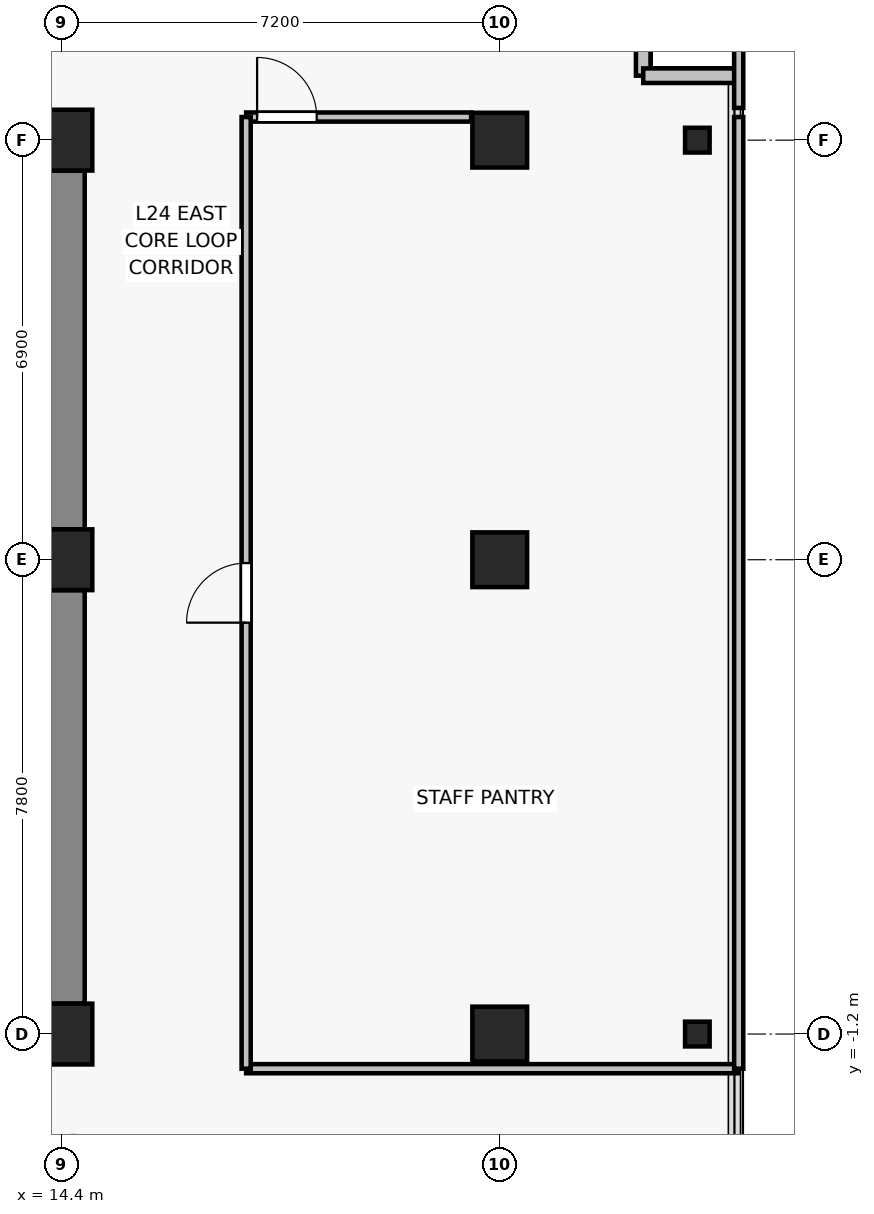
"""IFC4 building model, lengths in metres.
Left out: names, types, materials, properties, quantities, classifications, styles, units other than length and angle.
Written with IfcOpenShell. Run it as: python <this file> out.ifc"""

import sys

from ifc_helpers import new_model, si_unit, direction, frame, frame_2d, origin, origin_2d, place, context, subcontext, project, spatial, rectangle, i_section, extrude, source, transform, mapped, element, fill, save


model = new_model("IFC4")
c1 = context("Model", 3, precision=1e-05, world=origin(), true_north=direction((0.0, 1.0)))
c2 = subcontext(c1, "Body", "Model", "MODEL_VIEW")
j1 = project(units=[si_unit("LENGTHUNIT", "METRE"), si_unit("PLANEANGLEUNIT", "RADIAN")], contexts=[c1])
p1 = place(None, origin())
s1 = spatial("IfcSite", under=j1, at=p1, CompositionType="ELEMENT")
p2 = place(p1, origin())
s2 = spatial("IfcBuilding", under=s1, at=p2, CompositionType="ELEMENT")
p3 = place(p2, frame((0.0, 0.0, 90.1)))
s3 = spatial("IfcBuildingStorey", under=s2, at=p3, CompositionType="ELEMENT", Elevation=90.1)
for number, where, z_axis, x_axis in (
    (1, (14.4, -1.2, 0.0), (0.0, 0.0, 1.0), (1.0, 0.0, 0.0)),
    (2, (14.4, 6.6, 0.0), (0.0, 0.0, 1.0), (1.0, 0.0, 0.0)),
    (3, (14.4, 13.5, 0.0), (0.0, 0.0, 1.0), (1.0, 0.0, 0.0)),
):
    element("IfcColumn", number, at=place(p3, frame(where, z_axis=z_axis, x_axis=x_axis)), inside=s3, PredefinedType="COLUMN", context=c2, shape_type="SweptSolid", body=[
        extrude(rectangle(XDim=1.0, YDim=1.0, at=origin_2d()), origin(), (0.0, 0.0, 1.0), 3.3),
    ])
for number, where, z_axis, x_axis in (
    (4, (21.6, -1.2, 0.0), (0.0, 0.0, 1.0), (1.0, 0.0, 0.0)),
    (5, (21.6, 6.6, 0.0), (0.0, 0.0, 1.0), (1.0, 0.0, 0.0)),
    (6, (21.6, 13.5, 0.0), (0.0, 0.0, 1.0), (1.0, 0.0, 0.0)),
):
    element("IfcColumn", number, at=place(p3, frame(where, z_axis=z_axis, x_axis=x_axis)), inside=s3, PredefinedType="COLUMN", context=c2, shape_type="SweptSolid", body=[
        extrude(rectangle(XDim=0.9, YDim=0.9, at=origin_2d()), origin(), (0.0, 0.0, 1.0), 3.3),
    ])
for number, where, z_axis, x_axis in (
    (7, (24.85, -1.2, 0.0), (0.0, 0.0, 1.0), (1.0, 0.0, 0.0)),
    (8, (24.85, 13.5, 0.0), (0.0, 0.0, 1.0), (1.0, 0.0, 0.0)),
):
    element("IfcColumn", number, at=place(p3, frame(where, z_axis=z_axis, x_axis=x_axis)), inside=s3, PredefinedType="COLUMN", context=c2, shape_type="SweptSolid", body=[
        extrude(i_section(OverallWidth=0.404, OverallDepth=0.407, WebThickness=0.022, FlangeThickness=0.032, FilletRadius=0.015, at=origin_2d()), origin(), (0.0, 0.0, 1.0), 3.3),
    ])
p4 = place(p3, frame((14.4, -0.7, 0.0), z_axis=(0.0, 0.0, 1.0), x_axis=(0.0, 1.0, 0.0)))
e9 = element("IfcWall", 9, at=p4, inside=s3, PredefinedType="SHEAR", context=c2, shape_type="SweptSolid", body=[
    extrude(rectangle(XDim=6.8, YDim=0.75, at=frame_2d((3.4, 0.0))), origin(), (0.0, 0.0, 1.0), 3.075),
])
p5 = place(p3, frame((14.4, 7.1, 0.0), z_axis=(0.0, 0.0, 1.0), x_axis=(0.0, 1.0, 0.0)))
e10 = element("IfcWall", 10, at=p5, inside=s3, PredefinedType="SHEAR", context=c2, shape_type="SweptSolid", body=[
    extrude(rectangle(XDim=5.9, YDim=0.75, at=frame_2d((2.95, 0.0))), origin(), (0.0, 0.0, 1.0), 3.075),
])
for number, where, z_axis, x_axis in (
    (11, (23.96, 14.56, 0.0), (0.0, 0.0, 1.0), (0.0, 1.0, 0.0)),
    (12, (25.46, 14.56, 0.0), (0.0, 0.0, 1.0), (-1.0, 0.0, 0.0)),
):
    element("IfcWall", number, at=place(p3, frame(where, z_axis=z_axis, x_axis=x_axis)), inside=s3, PredefinedType="SOLIDWALL", context=c2, shape_type="SweptSolid", body=[
        extrude(rectangle(XDim=1.5, YDim=0.24, at=frame_2d((0.75, 0.0))), origin(), (0.0, 0.0, 1.0), 3.075),
    ])
p6 = place(p3, frame((25.53, -1.77, 0.0), z_axis=(0.0, 0.0, 1.0), x_axis=(-1.0, 0.0, 0.0)))
e13 = element("IfcWall", 13, at=p6, inside=s3, PredefinedType="PARTITIONING", context=c2, shape_type="SweptSolid", body=[
    extrude(rectangle(XDim=8.1, YDim=0.15, at=frame_2d((4.05, 0.0))), origin(), (0.0, 0.0, 1.0), 2.515),
])
p7 = place(p3, frame((17.43, 13.88, 0.0), z_axis=(0.0, 0.0, 1.0), x_axis=(1.0, 0.0, 0.0)))
e14 = element("IfcWall", 14, at=p7, inside=s3, PredefinedType="PARTITIONING", context=c2, shape_type="SweptSolid", body=[
    extrude(rectangle(XDim=3.7, YDim=0.15, at=frame_2d((1.85, 0.0))), origin(), (0.0, 0.0, 1.0), 3.075),
])
p8 = place(p7, frame((0.18, 0.0, 0.0)))
e15 = element("IfcOpeningElement", 15, at=p8, cuts=e14, PredefinedType="OPENING", context=c2, shape_type="SweptSolid", body=[
    extrude(rectangle(XDim=0.98, YDim=2.15, at=frame_2d((0.49, 1.075))), frame((0.0, 0.085, 0.0), z_axis=(0.0, -1.0, 0.0), x_axis=(1.0, 0.0, 0.0)), (0.0, 0.0, 1.0), 0.17),
])
p9 = place(p3, frame((17.43, -1.77, 0.0), z_axis=(0.0, 0.0, 1.0), x_axis=(0.0, 1.0, 0.0)))
e16 = element("IfcWall", 16, at=p9, inside=s3, PredefinedType="PARTITIONING", context=c2, shape_type="SweptSolid", body=[
    extrude(rectangle(XDim=15.65, YDim=0.15, at=frame_2d((7.825, 0.0))), origin(), (0.0, 0.0, 1.0), 2.515),
])
p10 = place(p9, frame((7.335, 0.0, 0.0)))
e17 = element("IfcOpeningElement", 17, at=p10, cuts=e16, PredefinedType="OPENING", context=c2, shape_type="SweptSolid", body=[
    extrude(rectangle(XDim=0.98, YDim=2.15, at=frame_2d((0.49, 1.075))), frame((0.0, 0.085, 0.0), z_axis=(0.0, -1.0, 0.0), x_axis=(1.0, 0.0, 0.0)), (0.0, 0.0, 1.0), 0.17),
])
p11 = place(p3, frame((25.53, 13.88, 0.0), z_axis=(0.0, 0.0, 1.0), x_axis=(0.0, -1.0, 0.0)))
e18 = element("IfcWall", 18, at=p11, inside=s3, PredefinedType="PARTITIONING", context=c2, shape_type="SweptSolid", body=[
    extrude(rectangle(XDim=15.65, YDim=0.15, at=frame_2d((7.825, 0.0))), origin(), (0.0, 0.0, 1.0), 3.075),
])
p12 = place(p3, frame((25.53, 17.63, 0.0), z_axis=(0.0, 0.0, 1.0), x_axis=(0.0, -1.0, 0.0)))
e19 = element("IfcWall", 19, at=p12, inside=s3, PredefinedType="PARTITIONING", context=c2, shape_type="SweptSolid", body=[
    extrude(rectangle(XDim=3.6, YDim=0.15, at=frame_2d((1.8, 0.0))), origin(), (0.0, 0.0, 1.0), 3.075),
])
m1 = source(origin(), c2, "Body", "SweptSolid", [
    extrude(rectangle(XDim=0.98, YDim=2.15, at=frame_2d((0.49, 1.075))), frame((0.0, 0.025, 0.0), z_axis=(0.0, -1.0, 0.0), x_axis=(1.0, 0.0, 0.0)), (0.0, 0.0, 1.0), 0.05),
])
p13 = place(p10, origin())
e20 = element("IfcDoor", 20, at=p13, inside=s3, OperationType="SINGLE_SWING_LEFT", PredefinedType="DOOR", context=c2, shape_type="MappedRepresentation", body=[
    mapped(m1, transform((0.0, 0.0, 0.0), x_axis=(1.0, 0.0, 0.0), y_axis=(0.0, 1.0, 0.0), z_axis=(0.0, 0.0, 1.0), scale=1.0)),
])
fill(e17, e20)
p14 = place(p8, origin())
e21 = element("IfcDoor", 21, at=p14, inside=s3, OperationType="SINGLE_SWING_LEFT", PredefinedType="DOOR", context=c2, shape_type="MappedRepresentation", body=[
    mapped(m1, transform((0.0, 0.0, 0.0), x_axis=(1.0, 0.0, 0.0), y_axis=(0.0, 1.0, 0.0), z_axis=(0.0, 0.0, 1.0), scale=1.0)),
])
fill(e15, e21)
save(model, sys.argv[1])
